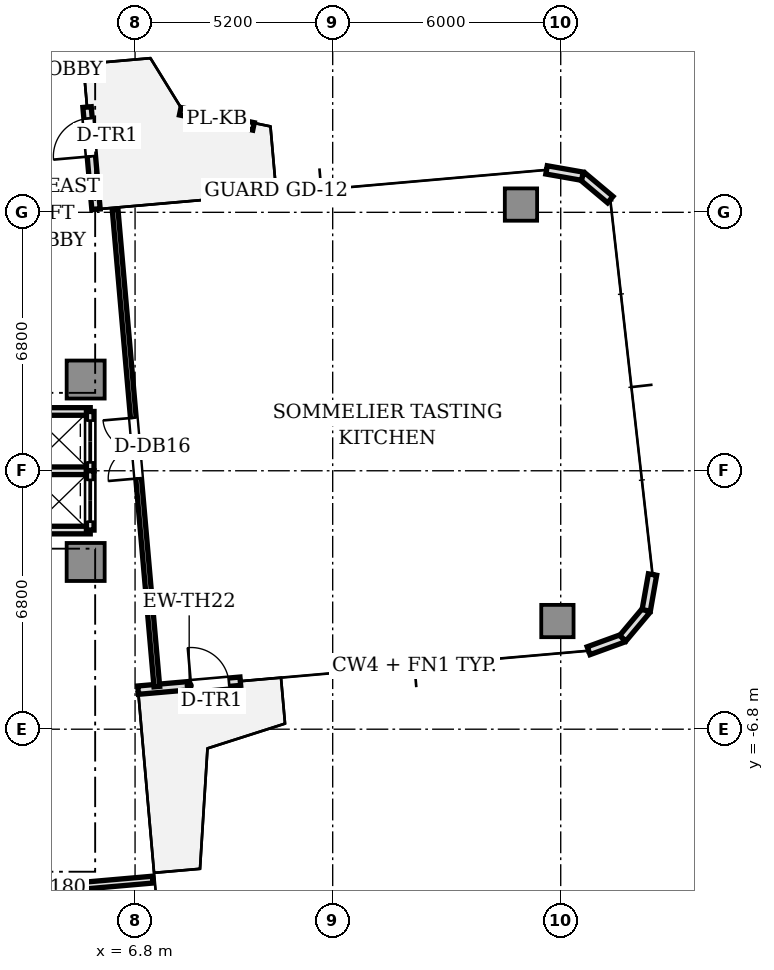
"""IFC4 building model, lengths in metres.
Left out: names, types, materials, properties, quantities, classifications, styles, units other than length and angle.
Written with IfcOpenShell. Run it as: python <this file> out.ifc"""

import sys

from ifc_helpers import new_model, si_unit, direction, frame, frame_2d, origin, origin_2d, place, context, subcontext, project, spatial, rectangle, extrude, source, transform, mapped, element, fill, save


model = new_model("IFC4")
c1 = context("Model", 3, precision=1e-05, world=origin(), true_north=direction((0.0, 1.0)))
c2 = subcontext(c1, "Body", "Model", "MODEL_VIEW")
j1 = project(units=[si_unit("LENGTHUNIT", "METRE"), si_unit("PLANEANGLEUNIT", "RADIAN")], contexts=[c1])
p1 = place(None, origin())
s1 = spatial("IfcSite", under=j1, at=p1, CompositionType="ELEMENT")
p2 = place(p1, origin())
s2 = spatial("IfcBuilding", under=s1, at=p2, CompositionType="ELEMENT")
p3 = place(p2, frame((0.0, 0.0, 185.25)))
s3 = spatial("IfcBuildingStorey", under=s2, at=p3, CompositionType="ELEMENT", Elevation=185.25)
m1 = source(origin(), c2, "Body", "SweptSolid", [
    extrude(rectangle(XDim=1.0, YDim=1.0, at=origin_2d()), origin(), (0.0, 0.0, 1.0), 3.11),
])
for number, where, z_axis, x_axis in (
    (1, (5.5, 2.4, 0.0), (0.0, 0.0, 1.0), (1.0, 0.0, 0.0)),
    (2, (5.5, -2.4, 0.0), (0.0, 0.0, 1.0), (1.0, 0.0, 0.0)),
):
    element("IfcColumn", number, at=place(p3, frame(where, z_axis=z_axis, x_axis=x_axis)), inside=s3, PredefinedType="COLUMN", context=c2, shape_type="MappedRepresentation", body=[
        mapped(m1, transform((0.0, 0.0, 0.0), scale=1.0)),
    ])
m2 = source(origin(), c2, "Body", "SweptSolid", [
    extrude(rectangle(XDim=0.85, YDim=0.85, at=origin_2d()), origin(), (0.0, 0.0, 1.0), 3.11),
])
for number, where, z_axis, x_axis in (
    (3, (17.913, -3.954, 0.0), (0.0, 0.0, 1.0), (1.0, 0.0, 0.0)),
    (4, (16.954, 7.004, 0.0), (0.0, 0.0, 1.0), (1.0, 0.0, 0.0)),
):
    element("IfcColumn", number, at=place(p3, frame(where, z_axis=z_axis, x_axis=x_axis)), inside=s3, PredefinedType="COLUMN", context=c2, shape_type="MappedRepresentation", body=[
        mapped(m2, transform((0.0, 0.0, 0.0), scale=1.0)),
    ])
p4 = place(p3, frame((6.879, -5.772, 0.0), z_axis=(0.0, 0.0, 1.0), x_axis=(0.996193619346, 0.087168071984, 0.0)))
e5 = element("IfcWall", 5, at=p4, inside=s3, PredefinedType="STANDARD", context=c2, shape_type="SweptSolid", body=[
    extrude(rectangle(XDim=2.7, YDim=0.22, at=frame_2d((1.35, 0.0))), origin(), (0.0, 0.0, 1.0), 3.11),
])
p5 = place(p4, frame((1.4, 0.0, 0.0)))
e6 = element("IfcOpeningElement", 6, at=p5, cuts=e5, PredefinedType="OPENING", context=c2, shape_type="SweptSolid", body=[
    extrude(rectangle(XDim=1.0, YDim=2.2, at=frame_2d((0.5, 1.1))), frame((0.0, 0.12, 0.0), z_axis=(0.0, -1.0, 0.0), x_axis=(1.0, 0.0, 0.0)), (0.0, 0.0, 1.0), 0.24),
])
p6 = place(p3, frame((18.734, -4.735, 0.0), z_axis=(0.0, 0.0, 1.0), x_axis=(0.939741306239, 0.34188635151, 0.0)))
e7 = element("IfcWall", 7, at=p6, inside=s3, PredefinedType="STANDARD", context=c2, shape_type="SweptSolid", body=[
    extrude(rectangle(XDim=0.958, YDim=0.22, at=frame_2d((0.479, 0.0))), origin(), (0.0, 0.0, 1.0), 3.11),
])
for number, where, z_axis, x_axis in (
    (8, (19.634, -4.408, 0.0), (0.0, 0.0, 1.0), (0.643, 0.766, 0.0)),
    (9, (20.25, -3.674, 0.0), (0.0, 0.0, 1.0), (0.174, 0.985, 0.0)),
):
    element("IfcWall", number, at=place(p3, frame(where, z_axis=z_axis, x_axis=x_axis)), inside=s3, PredefinedType="STANDARD", context=c2, shape_type="SweptSolid", body=[
        extrude(rectangle(XDim=0.958, YDim=0.22, at=frame_2d((0.479, 0.0))), origin(), (0.0, 0.0, 1.0), 3.11),
    ])
p7 = place(p3, frame((19.304, 7.135, 0.0), z_axis=(0.0, 0.0, 1.0), x_axis=(-0.766001159887, 0.642839189107, 0.0)))
e10 = element("IfcWall", 10, at=p7, inside=s3, PredefinedType="STANDARD", context=c2, shape_type="SweptSolid", body=[
    extrude(rectangle(XDim=0.958, YDim=0.22, at=frame_2d((0.479, 0.0))), origin(), (0.0, 0.0, 1.0), 3.11),
])
p8 = place(p3, frame((18.57, 7.75, 0.0), z_axis=(0.0, 0.0, 1.0), x_axis=(-0.984770724397, 0.173858046606, 0.0)))
e11 = element("IfcWall", 11, at=p8, inside=s3, PredefinedType="STANDARD", context=c2, shape_type="SweptSolid", body=[
    extrude(rectangle(XDim=0.958, YDim=0.22, at=frame_2d((0.479, 0.0))), origin(), (0.0, 0.0, 1.0), 3.11),
])
p9 = place(p3, frame((5.772, 6.879, 0.0), z_axis=(0.0, 0.0, 1.0), x_axis=(-0.087168071984, 0.996193619346, 0.0)))
e12 = element("IfcWall", 12, at=p9, inside=s3, PredefinedType="STANDARD", context=c2, shape_type="SweptSolid", body=[
    extrude(rectangle(XDim=2.7, YDim=0.22, at=frame_2d((1.35, 0.0))), origin(), (0.0, 0.0, 1.0), 3.11),
])
p10 = place(p9, frame((1.4, 0.0, 0.0)))
e13 = element("IfcOpeningElement", 13, at=p10, cuts=e12, PredefinedType="OPENING", context=c2, shape_type="SweptSolid", body=[
    extrude(rectangle(XDim=1.0, YDim=2.2, at=frame_2d((0.5, 1.1))), frame((0.0, 0.12, 0.0), z_axis=(0.0, -1.0, 0.0), x_axis=(1.0, 0.0, 0.0)), (0.0, 0.0, 1.0), 0.24),
])
p11 = place(p3, frame((9.917, 9.06, 0.0), z_axis=(0.0, 0.0, 1.0), x_axis=(-0.979257025883, 0.202622005862, 0.0)))
e14 = element("IfcWall", 14, at=p11, inside=s3, PredefinedType="PARAPET", context=c2, shape_type="SweptSolid", body=[
    extrude(rectangle(XDim=1.969, YDim=0.2, at=frame_2d((0.984, 0.0))), origin(), (0.0, 0.0, 1.0), 0.65),
])
for number, where, z_axis, x_axis in (
    (15, (3.98, 1.56, 0.0), (0.0, 0.0, 1.0), (1.0, 0.0, 0.0)),
    (16, (3.98, -1.56, 0.0), (0.0, 0.0, 1.0), (1.0, 0.0, 0.0)),
    (17, (3.98, 0.0, 0.0), (0.0, 0.0, 1.0), (1.0, 0.0, 0.0)),
):
    element("IfcWall", number, at=place(p3, frame(where, z_axis=z_axis, x_axis=x_axis)), inside=s3, PredefinedType="SOLIDWALL", context=c2, shape_type="SweptSolid", body=[
        extrude(rectangle(XDim=1.64, YDim=0.2, at=frame_2d((0.82, 0.0))), origin(), (0.0, 0.0, 1.0), 2.66),
    ])
p12 = place(p3, frame((5.62, 0.0, 0.0), z_axis=(0.0, 0.0, 1.0), x_axis=(0.0, 1.0, 0.0)))
e18 = element("IfcWall", 18, at=p12, inside=s3, PredefinedType="SOLIDWALL", context=c2, shape_type="SweptSolid", body=[
    extrude(rectangle(XDim=1.56, YDim=0.2, at=frame_2d((0.78, 0.0))), origin(), (0.0, 0.0, 1.0), 2.66),
])
p13 = place(p12, frame((0.22, 0.0, 0.0)))
e19 = element("IfcOpeningElement", 19, at=p13, cuts=e18, PredefinedType="OPENING", context=c2, shape_type="SweptSolid", body=[
    extrude(rectangle(XDim=1.1, YDim=2.2, at=frame_2d((0.55, 1.1))), frame((0.0, 0.11, 0.0), z_axis=(0.0, -1.0, 0.0), x_axis=(1.0, 0.0, 0.0)), (0.0, 0.0, 1.0), 0.22),
])
p14 = place(p3, frame((5.62, -1.56, 0.0), z_axis=(0.0, 0.0, 1.0), x_axis=(0.0, 1.0, 0.0)))
e20 = element("IfcWall", 20, at=p14, inside=s3, PredefinedType="SOLIDWALL", context=c2, shape_type="SweptSolid", body=[
    extrude(rectangle(XDim=1.56, YDim=0.2, at=frame_2d((0.78, 0.0))), origin(), (0.0, 0.0, 1.0), 2.66),
])
p15 = place(p14, frame((0.22, 0.0, 0.0)))
e21 = element("IfcOpeningElement", 21, at=p15, cuts=e20, PredefinedType="OPENING", context=c2, shape_type="SweptSolid", body=[
    extrude(rectangle(XDim=1.1, YDim=2.2, at=frame_2d((0.55, 1.1))), frame((0.0, 0.11, 0.0), z_axis=(0.0, -1.0, 0.0), x_axis=(1.0, 0.0, 0.0)), (0.0, 0.0, 1.0), 0.22),
])
p16 = place(p3, frame((7.373, -5.679, 0.0), z_axis=(0.0, 0.0, 1.0), x_axis=(-0.087154691724, 0.996194790044, 0.0)))
e22 = element("IfcWall", 22, at=p16, inside=s3, PredefinedType="PARTITIONING", context=c2, shape_type="SweptSolid", body=[
    extrude(rectangle(XDim=12.6, YDim=0.15, at=frame_2d((6.3, 0.0))), origin(), (0.0, 0.0, 1.0), 2.66),
])
p17 = place(p16, frame((5.5, 0.0, 0.0)))
e23 = element("IfcOpeningElement", 23, at=p17, cuts=e22, PredefinedType="OPENING", context=c2, shape_type="SweptSolid", body=[
    extrude(rectangle(XDim=1.6, YDim=2.25, at=frame_2d((0.8, 1.125))), frame((0.0, 0.085, 0.0), z_axis=(0.0, -1.0, 0.0), x_axis=(1.0, 0.0, 0.0)), (0.0, 0.0, 1.0), 0.17),
])
p18 = place(p3, frame((5.287, 11.856, 0.0), z_axis=(0.0, 0.0, 1.0), x_axis=(-0.996194790044, -0.087154691724, 0.0)))
e24 = element("IfcWall", 24, at=p18, inside=s3, PredefinedType="PARTITIONING", context=c2, shape_type="SweptSolid", body=[
    extrude(rectangle(XDim=12.6, YDim=0.15, at=frame_2d((6.3, 0.0))), origin(), (0.0, 0.0, 1.0), 2.66),
])
p19 = place(p18, frame((5.5, 0.0, 0.0)))
e25 = element("IfcOpeningElement", 25, at=p19, cuts=e24, PredefinedType="OPENING", context=c2, shape_type="SweptSolid", body=[
    extrude(rectangle(XDim=1.6, YDim=2.25, at=frame_2d((0.8, 1.125))), frame((0.0, 0.085, 0.0), z_axis=(0.0, -1.0, 0.0), x_axis=(1.0, 0.0, 0.0)), (0.0, 0.0, 1.0), 0.17),
])
p20 = place(p3, frame((1.936, -11.224, 0.0), z_axis=(0.0, 0.0, 1.0), x_axis=(0.996194212812, 0.087161289348, 0.0)))
e26 = element("IfcWall", 26, at=p20, inside=s3, PredefinedType="PARTITIONING", context=c2, shape_type="SweptSolid", body=[
    extrude(rectangle(XDim=5.35, YDim=0.18, at=frame_2d((2.675, 0.0))), origin(), (0.0, 0.0, 1.0), 2.66),
])
m3 = source(origin(), c2, "Body", "SweptSolid", [
    extrude(rectangle(XDim=1.0, YDim=0.05, at=origin_2d()), origin(), (0.0, 0.0, 1.0), 2.2),
])
p21 = place(p5, frame((0.5, 0.0, 0.0)))
e27 = element("IfcDoor", 27, at=p21, inside=s3, OperationType="SINGLE_SWING_LEFT", PredefinedType="DOOR", context=c2, shape_type="MappedRepresentation", body=[
    mapped(m3, transform((0.0, 0.0, 0.0), scale=1.0)),
])
fill(e6, e27)
p22 = place(p10, frame((0.5, 0.0, 0.0)))
e28 = element("IfcDoor", 28, at=p22, inside=s3, OperationType="SINGLE_SWING_LEFT", PredefinedType="DOOR", context=c2, shape_type="MappedRepresentation", body=[
    mapped(m3, transform((0.0, 0.0, 0.0), scale=1.0)),
])
fill(e13, e28)
m4 = source(origin(), c2, "Body", "SweptSolid", [
    extrude(rectangle(XDim=1.1, YDim=0.05, at=origin_2d()), origin(), (0.0, 0.0, 1.0), 2.2),
])
p23 = place(p13, frame((0.55, 0.0, 0.0)))
e29 = element("IfcDoor", 29, at=p23, inside=s3, OperationType="DOUBLE_DOOR_SLIDING", PredefinedType="DOOR", context=c2, shape_type="MappedRepresentation", body=[
    mapped(m4, transform((0.0, 0.0, 0.0), scale=1.0)),
])
fill(e19, e29)
p24 = place(p15, frame((0.55, 0.0, 0.0)))
e30 = element("IfcDoor", 30, at=p24, inside=s3, OperationType="DOUBLE_DOOR_SLIDING", PredefinedType="DOOR", context=c2, shape_type="MappedRepresentation", body=[
    mapped(m4, transform((0.0, 0.0, 0.0), scale=1.0)),
])
fill(e21, e30)
m5 = source(origin(), c2, "Body", "SweptSolid", [
    extrude(rectangle(XDim=1.6, YDim=0.05, at=origin_2d()), origin(), (0.0, 0.0, 1.0), 2.25),
])
p25 = place(p17, frame((0.8, 0.0, 0.0)))
e31 = element("IfcDoor", 31, at=p25, inside=s3, OperationType="DOUBLE_DOOR_SINGLE_SWING", PredefinedType="DOOR", context=c2, shape_type="MappedRepresentation", body=[
    mapped(m5, transform((0.0, 0.0, 0.0), scale=1.0)),
])
fill(e23, e31)
save(model, sys.argv[1])
